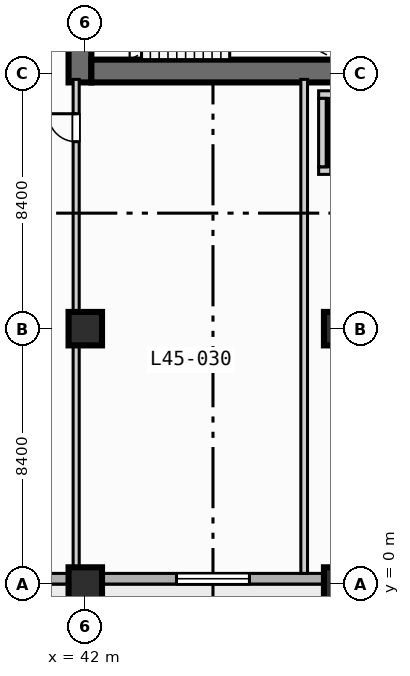
"""IFC4 building model, lengths in metres.
Left out: names, types, materials, properties, quantities, classifications, styles, units other than length and angle.
Written with IfcOpenShell. Run it as: python <this file> out.ifc"""

import sys

from ifc_helpers import new_model, si_unit, direction, frame, frame_2d, origin, origin_2d, place, context, subcontext, project, spatial, rectangle, extrude, element, fill, save


model = new_model("IFC4")
c1 = context("Model", 3, precision=1e-05, world=origin(), true_north=direction((0.0, 1.0)))
c2 = subcontext(c1, "Body", "Model", "MODEL_VIEW")
j1 = project(units=[si_unit("LENGTHUNIT", "METRE"), si_unit("PLANEANGLEUNIT", "RADIAN")], contexts=[c1])
p1 = place(None, origin())
s1 = spatial("IfcSite", under=j1, at=p1, CompositionType="ELEMENT")
p2 = place(p1, origin())
s2 = spatial("IfcBuilding", under=s1, at=p2, CompositionType="ELEMENT")
p3 = place(p2, frame((0.0, 0.0, 186.5)))
s3 = spatial("IfcBuildingStorey", under=s2, at=p3, CompositionType="ELEMENT", Elevation=186.5)
p4 = place(p3, frame((41.825, 16.5, 0.0), z_axis=(0.0, 0.0, 1.0), x_axis=(0.0, 1.0, 0.0)))
e1 = element("IfcWall", 1, at=p4, inside=s3, PredefinedType="SHEAR", context=c2, shape_type="SweptSolid", body=[
    extrude(rectangle(XDim=1.5, YDim=0.75, at=frame_2d((0.75, 0.0))), origin(), (0.0, 0.0, 1.0), 3.47),
])
p5 = place(p3, frame((42.2, 16.875, 0.0), z_axis=(0.0, 0.0, 1.0), x_axis=(1.0, 0.0, 0.0)))
e2 = element("IfcWall", 2, at=p5, inside=s3, PredefinedType="SHEAR", context=c2, shape_type="SweptSolid", body=[
    extrude(rectangle(XDim=16.35, YDim=0.75, at=frame_2d((8.175, 0.0))), origin(), (0.0, 0.0, 1.0), 3.47),
])
for number, where, z_axis, x_axis in (
    (3, (42.0, 0.0, 0.0), (0.0, 0.0, 1.0), (1.0, 0.0, 0.0)),
    (4, (42.0, 8.4, 0.0), (0.0, 0.0, 1.0), (1.0, 0.0, 0.0)),
    (5, (50.4, 0.0, 0.0), (0.0, 0.0, 1.0), (1.0, 0.0, 0.0)),
    (6, (50.4, 8.4, 0.0), (0.0, 0.0, 1.0), (1.0, 0.0, 0.0)),
):
    element("IfcColumn", number, at=place(p3, frame(where, z_axis=z_axis, x_axis=x_axis)), inside=s3, PredefinedType="COLUMN", context=c2, shape_type="SweptSolid", body=[
        extrude(rectangle(XDim=1.1, YDim=1.1, at=origin_2d()), origin(), (0.0, 0.0, 1.0), 3.7),
    ])
p6 = place(p3, frame((72.425, 0.175, 0.0), z_axis=(0.0, 0.0, 1.0), x_axis=(-1.0, 0.0, 0.0)))
e7 = element("IfcWall", 7, at=p6, inside=s3, PredefinedType="STANDARD", context=c2, shape_type="SweptSolid", body=[
    extrude(rectangle(XDim=69.25, YDim=0.35, at=frame_2d((34.625, 0.0))), origin(), (0.0, 0.0, 1.0), 3.47),
])
p7 = place(p6, frame((50.725, 0.0, 0.0)))
e8 = element("IfcOpeningElement", 8, at=p7, cuts=e7, PredefinedType="OPENING", context=c2, shape_type="SweptSolid", body=[
    extrude(rectangle(XDim=1.4, YDim=2.2, at=frame_2d((0.7, 1.1))), frame((0.0, 0.185, 0.0), z_axis=(0.0, -1.0, 0.0), x_axis=(1.0, 0.0, 0.0)), (0.0, 0.0, 1.0), 0.37),
])
p8 = place(p6, frame((58.625, 0.0, 0.85)))
e9 = element("IfcOpeningElement", 9, at=p8, cuts=e7, PredefinedType="OPENING", context=c2, shape_type="SweptSolid", body=[
    extrude(rectangle(XDim=2.4, YDim=1.95, at=frame_2d((1.2, 0.975))), frame((0.0, 0.185, 0.0), z_axis=(0.0, -1.0, 0.0), x_axis=(1.0, 0.0, 0.0)), (0.0, 0.0, 1.0), 0.37),
])
p9 = place(p6, frame((41.825, 0.0, 0.85)))
e10 = element("IfcOpeningElement", 10, at=p9, cuts=e7, PredefinedType="OPENING", context=c2, shape_type="SweptSolid", body=[
    extrude(rectangle(XDim=2.4, YDim=1.95, at=frame_2d((1.2, 0.975))), frame((0.0, 0.185, 0.0), z_axis=(0.0, -1.0, 0.0), x_axis=(1.0, 0.0, 0.0)), (0.0, 0.0, 1.0), 0.37),
])
p10 = place(p6, frame((33.725, 0.0, 0.85)))
e11 = element("IfcOpeningElement", 11, at=p10, cuts=e7, PredefinedType="OPENING", context=c2, shape_type="SweptSolid", body=[
    extrude(rectangle(XDim=1.8, YDim=1.8, at=frame_2d((0.9, 0.9))), frame((0.0, 0.185, 0.0), z_axis=(0.0, -1.0, 0.0), x_axis=(1.0, 0.0, 0.0)), (0.0, 0.0, 1.0), 0.37),
])
p11 = place(p6, frame((25.025, 0.0, 0.85)))
e12 = element("IfcOpeningElement", 12, at=p11, cuts=e7, PredefinedType="OPENING", context=c2, shape_type="SweptSolid", body=[
    extrude(rectangle(XDim=2.4, YDim=1.95, at=frame_2d((1.2, 0.975))), frame((0.0, 0.185, 0.0), z_axis=(0.0, -1.0, 0.0), x_axis=(1.0, 0.0, 0.0)), (0.0, 0.0, 1.0), 0.37),
])
p12 = place(p6, frame((67.075, 0.0, 0.85)))
e13 = element("IfcOpeningElement", 13, at=p12, cuts=e7, PredefinedType="OPENING", context=c2, shape_type="SweptSolid", body=[
    extrude(rectangle(XDim=1.8, YDim=1.8, at=frame_2d((0.9, 0.9))), frame((0.0, 0.185, 0.0), z_axis=(0.0, -1.0, 0.0), x_axis=(1.0, 0.0, 0.0)), (0.0, 0.0, 1.0), 0.37),
])
p13 = place(p6, frame((56.39, 0.0, 0.85)))
e14 = element("IfcOpeningElement", 14, at=p13, cuts=e7, PredefinedType="OPENING", context=c2, shape_type="SweptSolid", body=[
    extrude(rectangle(XDim=0.72, YDim=1.8, at=frame_2d((0.36, 0.9))), frame((0.0, 0.185, 0.0), z_axis=(0.0, -1.0, 0.0), x_axis=(1.0, 0.0, 0.0)), (0.0, 0.0, 1.0), 0.37),
])
p14 = place(p6, frame((9.075, 0.0, 0.85)))
e15 = element("IfcOpeningElement", 15, at=p14, cuts=e7, PredefinedType="OPENING", context=c2, shape_type="SweptSolid", body=[
    extrude(rectangle(XDim=1.8, YDim=1.8, at=frame_2d((0.9, 0.9))), frame((0.0, 0.185, 0.0), z_axis=(0.0, -1.0, 0.0), x_axis=(1.0, 0.0, 0.0)), (0.0, 0.0, 1.0), 0.37),
])
p15 = place(p6, frame((2.675, 0.0, 0.85)))
e16 = element("IfcOpeningElement", 16, at=p15, cuts=e7, PredefinedType="OPENING", context=c2, shape_type="SweptSolid", body=[
    extrude(rectangle(XDim=1.8, YDim=1.8, at=frame_2d((0.9, 0.9))), frame((0.0, 0.185, 0.0), z_axis=(0.0, -1.0, 0.0), x_axis=(1.0, 0.0, 0.0)), (0.0, 0.0, 1.0), 0.37),
])
p16 = place(p3, frame((49.675, 13.6, 0.0), z_axis=(0.0, 0.0, 1.0), x_axis=(1.0, 0.0, 0.0)))
e17 = element("IfcWall", 17, at=p16, inside=s3, PredefinedType="SOLIDWALL", context=c2, shape_type="SweptSolid", body=[
    extrude(rectangle(XDim=2.25, YDim=0.25, at=frame_2d((1.125, 0.0))), origin(), (0.0, 0.0, 1.0), 3.47),
])
p17 = place(p16, frame((0.4, 0.0, 0.0)))
e18 = element("IfcOpeningElement", 18, at=p17, cuts=e17, PredefinedType="OPENING", context=c2, shape_type="SweptSolid", body=[
    extrude(rectangle(XDim=1.1, YDim=2.15, at=frame_2d((0.55, 1.075))), frame((0.0, 0.135, 0.0), z_axis=(0.0, -1.0, 0.0), x_axis=(1.0, 0.0, 0.0)), (0.0, 0.0, 1.0), 0.27),
])
for number, where, z_axis, x_axis in (
    (19, (49.675, 16.1, 0.0), (0.0, 0.0, 1.0), (1.0, 0.0, 0.0)),
    (20, (49.8, 13.725, 0.0), (0.0, 0.0, 1.0), (0.0, 1.0, 0.0)),
):
    element("IfcWall", number, at=place(p3, frame(where, z_axis=z_axis, x_axis=x_axis)), inside=s3, PredefinedType="SOLIDWALL", context=c2, shape_type="SweptSolid", body=[
        extrude(rectangle(XDim=2.25, YDim=0.25, at=frame_2d((1.125, 0.0))), origin(), (0.0, 0.0, 1.0), 3.47),
    ])
p18 = place(p3, frame((41.7, 0.35, 0.0), z_axis=(0.0, 0.0, 1.0), x_axis=(0.0, 1.0, 0.0)))
e21 = element("IfcWall", 21, at=p18, inside=s3, PredefinedType="PARTITIONING", context=c2, shape_type="SweptSolid", body=[
    extrude(rectangle(XDim=16.25, YDim=0.2, at=frame_2d((8.125, 0.0))), origin(), (0.0, 0.0, 1.0), 2.82),
])
p19 = place(p18, frame((14.2, 0.0, 0.0)))
e22 = element("IfcOpeningElement", 22, at=p19, cuts=e21, PredefinedType="OPENING", context=c2, shape_type="SweptSolid", body=[
    extrude(rectangle(XDim=0.92, YDim=2.1, at=frame_2d((0.46, 1.05))), frame((0.0, 0.11, 0.0), z_axis=(0.0, -1.0, 0.0), x_axis=(1.0, 0.0, 0.0)), (0.0, 0.0, 1.0), 0.22),
])
p20 = place(p3, frame((49.2, 0.35, 0.0), z_axis=(0.0, 0.0, 1.0), x_axis=(0.0, 1.0, 0.0)))
e23 = element("IfcWall", 23, at=p20, inside=s3, PredefinedType="PARTITIONING", context=c2, shape_type="SweptSolid", body=[
    extrude(rectangle(XDim=16.25, YDim=0.22, at=frame_2d((8.125, 0.0))), origin(), (0.0, 0.0, 1.0), 3.47),
])
p21 = place(p11, origin())
e24 = element("IfcWindow", 24, at=p21, inside=s3, PartitioningType="SINGLE_PANEL", PredefinedType="WINDOW", context=c2, shape_type="SweptSolid", body=[
    extrude(rectangle(XDim=2.4, YDim=1.95, at=frame_2d((1.2, 0.975))), frame((0.0, 0.03, 0.0), z_axis=(0.0, -1.0, 0.0), x_axis=(1.0, 0.0, 0.0)), (0.0, 0.0, 1.0), 0.06),
])
fill(e12, e24)
p22 = place(p19, origin())
e25 = element("IfcDoor", 25, at=p22, inside=s3, OperationType="SINGLE_SWING_RIGHT", PredefinedType="DOOR", context=c2, shape_type="SweptSolid", body=[
    extrude(rectangle(XDim=0.92, YDim=2.1, at=frame_2d((0.46, 1.05))), frame((0.0, 0.025, 0.0), z_axis=(0.0, -1.0, 0.0), x_axis=(1.0, 0.0, 0.0)), (0.0, 0.0, 1.0), 0.05),
])
fill(e22, e25)
save(model, sys.argv[1])
